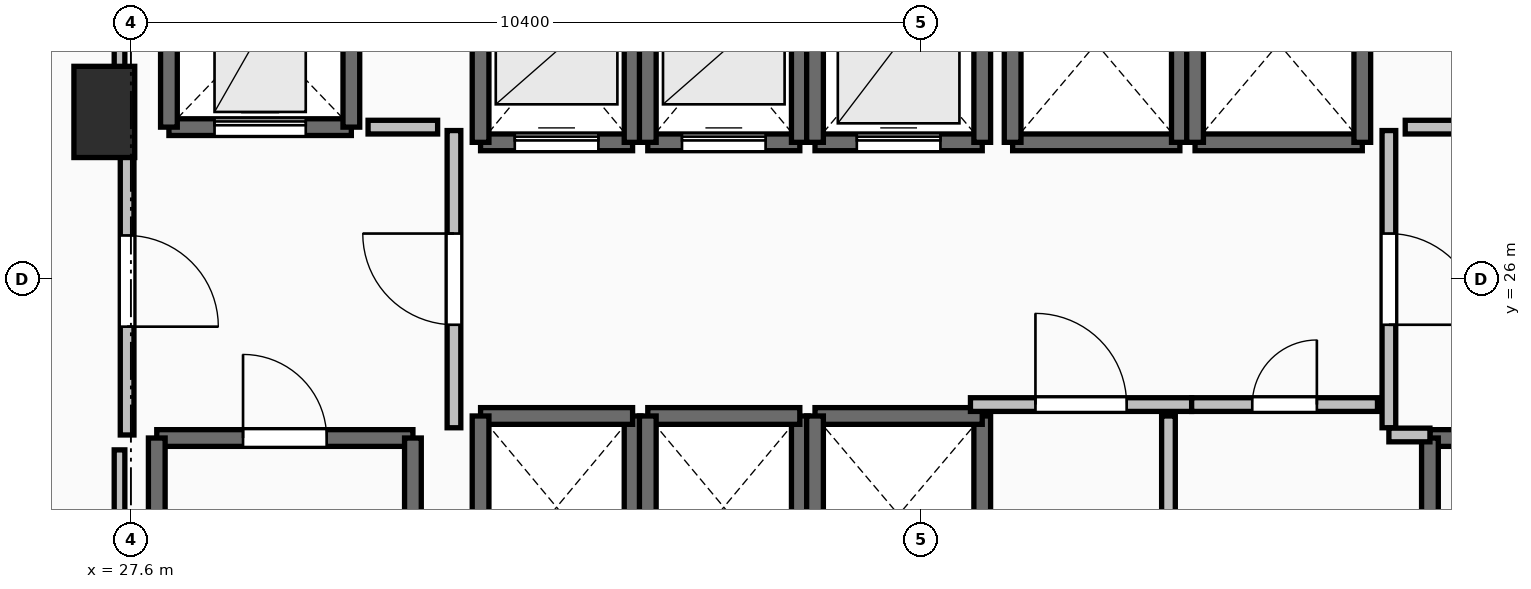
"""IFC4 building model, lengths in metres.
Left out: names, types, materials, properties, quantities, classifications, styles, units other than length and angle.
Written with IfcOpenShell. Run it as: python <this file> out.ifc"""

import sys

from ifc_helpers import new_model, si_unit, direction, frame, frame_2d, origin, origin_2d, place, context, subcontext, project, spatial, rectangle, extrude, element, fill, save


model = new_model("IFC4")
c1 = context("Model", 3, precision=1e-05, world=origin(), true_north=direction((0.0, 1.0)))
c2 = subcontext(c1, "Body", "Model", "MODEL_VIEW")
j1 = project(units=[si_unit("LENGTHUNIT", "METRE"), si_unit("PLANEANGLEUNIT", "RADIAN")], contexts=[c1])
p1 = place(None, origin())
s1 = spatial("IfcSite", under=j1, at=p1, CompositionType="ELEMENT")
p2 = place(p1, origin())
s2 = spatial("IfcBuilding", under=s1, at=p2, CompositionType="ELEMENT")
p3 = place(p2, frame((0.0, 0.0, 96.3)))
s3 = spatial("IfcBuildingStorey", under=s2, at=p3, CompositionType="ELEMENT", Elevation=96.3)
p4 = place(p3, frame((27.25, 28.2, 0.0), z_axis=(0.0, 0.0, 1.0), x_axis=(1.0, 0.0, 0.0)))
e1 = element("IfcColumn", 1, at=p4, inside=s3, PredefinedType="PILASTER", context=c2, shape_type="SweptSolid", body=[
    extrude(rectangle(XDim=0.8, YDim=1.2, at=origin_2d()), origin(), (0.0, 0.0, 1.0), 3.5),
])
p5 = place(p3, frame((27.94, 23.91, 0.0), z_axis=(0.0, 0.0, 1.0), x_axis=(1.0, 0.0, 0.0)))
e2 = element("IfcWall", 2, at=p5, inside=s3, PredefinedType="SOLIDWALL", context=c2, shape_type="SweptSolid", body=[
    extrude(rectangle(XDim=3.37, YDim=0.22, at=frame_2d((1.685, 0.0))), origin(), (0.0, 0.0, 1.0), 3.24),
])
p6 = place(p5, frame((1.135, 0.0, 0.0)))
e3 = element("IfcOpeningElement", 3, at=p6, cuts=e2, PredefinedType="OPENING", context=c2, shape_type="SweptSolid", body=[
    extrude(rectangle(XDim=1.1, YDim=2.15, at=frame_2d((0.55, 1.075))), frame((0.0, 0.125, 0.0), z_axis=(0.0, -1.0, 0.0), x_axis=(1.0, 0.0, 0.0)), (0.0, 0.0, 1.0), 0.25),
])
for number, where, z_axis, x_axis in (
    (4, (31.31, 23.91, 0.0), (0.0, 0.0, 1.0), (0.0, -1.0, 0.0)),
    (5, (27.94, 16.49, 0.0), (0.0, 0.0, 1.0), (0.0, 1.0, 0.0)),
):
    element("IfcWall", number, at=place(p3, frame(where, z_axis=z_axis, x_axis=x_axis)), inside=s3, PredefinedType="SOLIDWALL", context=c2, shape_type="SweptSolid", body=[
        extrude(rectangle(XDim=7.42, YDim=0.22, at=frame_2d((3.71, 0.0))), origin(), (0.0, 0.0, 1.0), 3.24),
    ])
p7 = place(p3, frame((44.69, 23.91, 0.0), z_axis=(0.0, 0.0, 1.0), x_axis=(1.0, 0.0, 0.0)))
e6 = element("IfcWall", 6, at=p7, inside=s3, PredefinedType="SOLIDWALL", context=c2, shape_type="SweptSolid", body=[
    extrude(rectangle(XDim=3.37, YDim=0.22, at=frame_2d((1.685, 0.0))), origin(), (0.0, 0.0, 1.0), 3.24),
])
p8 = place(p7, frame((1.135, 0.0, 0.0)))
e7 = element("IfcOpeningElement", 7, at=p8, cuts=e6, PredefinedType="OPENING", context=c2, shape_type="SweptSolid", body=[
    extrude(rectangle(XDim=1.1, YDim=2.15, at=frame_2d((0.55, 1.075))), frame((0.0, 0.125, 0.0), z_axis=(0.0, -1.0, 0.0), x_axis=(1.0, 0.0, 0.0)), (0.0, 0.0, 1.0), 0.25),
])
p9 = place(p3, frame((44.69, 16.49, 0.0), z_axis=(0.0, 0.0, 1.0), x_axis=(0.0, 1.0, 0.0)))
e8 = element("IfcWall", 8, at=p9, inside=s3, PredefinedType="SOLIDWALL", context=c2, shape_type="SweptSolid", body=[
    extrude(rectangle(XDim=7.42, YDim=0.22, at=frame_2d((3.71, 0.0))), origin(), (0.0, 0.0, 1.0), 3.24),
])
p10 = place(p3, frame((32.2, 27.8, 0.0), z_axis=(0.0, 0.0, 1.0), x_axis=(1.0, 0.0, 0.0)))
e9 = element("IfcWall", 9, at=p10, inside=s3, PredefinedType="SOLIDWALL", context=c2, shape_type="SweptSolid", body=[
    extrude(rectangle(XDim=2.0, YDim=0.22, at=frame_2d((1.0, 0.0))), origin(), (0.0, 0.0, 1.0), 3.24),
])
p11 = place(p10, frame((0.45, 0.0, 0.0)))
e10 = element("IfcOpeningElement", 10, at=p11, cuts=e9, PredefinedType="OPENING", context=c2, shape_type="SweptSolid", body=[
    extrude(rectangle(XDim=1.1, YDim=2.2, at=frame_2d((0.55, 1.1))), frame((0.0, 0.125, 0.0), z_axis=(0.0, -1.0, 0.0), x_axis=(1.0, 0.0, 0.0)), (0.0, 0.0, 1.0), 0.25),
])
for number, where, z_axis, x_axis in (
    (11, (34.2, 27.8, 0.0), (0.0, 0.0, 1.0), (0.0, 1.0, 0.0)),
    (12, (32.2, 30.2, 0.0), (0.0, 0.0, 1.0), (0.0, -1.0, 0.0)),
):
    element("IfcWall", number, at=place(p3, frame(where, z_axis=z_axis, x_axis=x_axis)), inside=s3, PredefinedType="SOLIDWALL", context=c2, shape_type="SweptSolid", body=[
        extrude(rectangle(XDim=2.4, YDim=0.22, at=frame_2d((1.2, 0.0))), origin(), (0.0, 0.0, 1.0), 3.24),
    ])
p12 = place(p3, frame((34.4, 27.8, 0.0), z_axis=(0.0, 0.0, 1.0), x_axis=(1.0, 0.0, 0.0)))
e13 = element("IfcWall", 13, at=p12, inside=s3, PredefinedType="SOLIDWALL", context=c2, shape_type="SweptSolid", body=[
    extrude(rectangle(XDim=2.0, YDim=0.22, at=frame_2d((1.0, 0.0))), origin(), (0.0, 0.0, 1.0), 3.24),
])
p13 = place(p12, frame((0.45, 0.0, 0.0)))
e14 = element("IfcOpeningElement", 14, at=p13, cuts=e13, PredefinedType="OPENING", context=c2, shape_type="SweptSolid", body=[
    extrude(rectangle(XDim=1.1, YDim=2.2, at=frame_2d((0.55, 1.1))), frame((0.0, 0.125, 0.0), z_axis=(0.0, -1.0, 0.0), x_axis=(1.0, 0.0, 0.0)), (0.0, 0.0, 1.0), 0.25),
])
for number, where, z_axis, x_axis in (
    (15, (36.4, 27.8, 0.0), (0.0, 0.0, 1.0), (0.0, 1.0, 0.0)),
    (16, (34.4, 30.2, 0.0), (0.0, 0.0, 1.0), (0.0, -1.0, 0.0)),
):
    element("IfcWall", number, at=place(p3, frame(where, z_axis=z_axis, x_axis=x_axis)), inside=s3, PredefinedType="SOLIDWALL", context=c2, shape_type="SweptSolid", body=[
        extrude(rectangle(XDim=2.4, YDim=0.22, at=frame_2d((1.2, 0.0))), origin(), (0.0, 0.0, 1.0), 3.24),
    ])
p14 = place(p3, frame((36.6, 27.8, 0.0), z_axis=(0.0, 0.0, 1.0), x_axis=(1.0, 0.0, 0.0)))
e17 = element("IfcWall", 17, at=p14, inside=s3, PredefinedType="SOLIDWALL", context=c2, shape_type="SweptSolid", body=[
    extrude(rectangle(XDim=2.2, YDim=0.22, at=frame_2d((1.1, 0.0))), origin(), (0.0, 0.0, 1.0), 3.24),
])
p15 = place(p14, frame((0.55, 0.0, 0.0)))
e18 = element("IfcOpeningElement", 18, at=p15, cuts=e17, PredefinedType="OPENING", context=c2, shape_type="SweptSolid", body=[
    extrude(rectangle(XDim=1.1, YDim=2.2, at=frame_2d((0.55, 1.1))), frame((0.0, 0.125, 0.0), z_axis=(0.0, -1.0, 0.0), x_axis=(1.0, 0.0, 0.0)), (0.0, 0.0, 1.0), 0.25),
])
for number, where, z_axis, x_axis in (
    (19, (38.8, 27.8, 0.0), (0.0, 0.0, 1.0), (0.0, 1.0, 0.0)),
    (20, (36.6, 30.4, 0.0), (0.0, 0.0, 1.0), (0.0, -1.0, 0.0)),
):
    element("IfcWall", number, at=place(p3, frame(where, z_axis=z_axis, x_axis=x_axis)), inside=s3, PredefinedType="SOLIDWALL", context=c2, shape_type="SweptSolid", body=[
        extrude(rectangle(XDim=2.6, YDim=0.22, at=frame_2d((1.3, 0.0))), origin(), (0.0, 0.0, 1.0), 3.24),
    ])
p16 = place(p3, frame((34.2, 21.8, 0.0), z_axis=(0.0, 0.0, 1.0), x_axis=(0.0, 1.0, 0.0)))
e21 = element("IfcWall", 21, at=p16, inside=s3, PredefinedType="SOLIDWALL", context=c2, shape_type="SweptSolid", body=[
    extrude(rectangle(XDim=2.4, YDim=0.22, at=frame_2d((1.2, 0.0))), origin(), (0.0, 0.0, 1.0), 3.24),
])
p17 = place(p3, frame((34.2, 24.2, 0.0), z_axis=(0.0, 0.0, 1.0), x_axis=(-1.0, 0.0, 0.0)))
e22 = element("IfcWall", 22, at=p17, inside=s3, PredefinedType="SOLIDWALL", context=c2, shape_type="SweptSolid", body=[
    extrude(rectangle(XDim=2.0, YDim=0.22, at=frame_2d((1.0, 0.0))), origin(), (0.0, 0.0, 1.0), 3.24),
])
for number, where, z_axis, x_axis in (
    (23, (32.2, 24.2, 0.0), (0.0, 0.0, 1.0), (0.0, -1.0, 0.0)),
    (24, (36.4, 21.8, 0.0), (0.0, 0.0, 1.0), (0.0, 1.0, 0.0)),
):
    element("IfcWall", number, at=place(p3, frame(where, z_axis=z_axis, x_axis=x_axis)), inside=s3, PredefinedType="SOLIDWALL", context=c2, shape_type="SweptSolid", body=[
        extrude(rectangle(XDim=2.4, YDim=0.22, at=frame_2d((1.2, 0.0))), origin(), (0.0, 0.0, 1.0), 3.24),
    ])
p18 = place(p3, frame((36.4, 24.2, 0.0), z_axis=(0.0, 0.0, 1.0), x_axis=(-1.0, 0.0, 0.0)))
e25 = element("IfcWall", 25, at=p18, inside=s3, PredefinedType="SOLIDWALL", context=c2, shape_type="SweptSolid", body=[
    extrude(rectangle(XDim=2.0, YDim=0.22, at=frame_2d((1.0, 0.0))), origin(), (0.0, 0.0, 1.0), 3.24),
])
p19 = place(p3, frame((34.4, 24.2, 0.0), z_axis=(0.0, 0.0, 1.0), x_axis=(0.0, -1.0, 0.0)))
e26 = element("IfcWall", 26, at=p19, inside=s3, PredefinedType="SOLIDWALL", context=c2, shape_type="SweptSolid", body=[
    extrude(rectangle(XDim=2.4, YDim=0.22, at=frame_2d((1.2, 0.0))), origin(), (0.0, 0.0, 1.0), 3.24),
])
p20 = place(p3, frame((38.8, 21.6, 0.0), z_axis=(0.0, 0.0, 1.0), x_axis=(0.0, 1.0, 0.0)))
e27 = element("IfcWall", 27, at=p20, inside=s3, PredefinedType="SOLIDWALL", context=c2, shape_type="SweptSolid", body=[
    extrude(rectangle(XDim=2.6, YDim=0.22, at=frame_2d((1.3, 0.0))), origin(), (0.0, 0.0, 1.0), 3.24),
])
p21 = place(p3, frame((38.8, 24.2, 0.0), z_axis=(0.0, 0.0, 1.0), x_axis=(-1.0, 0.0, 0.0)))
e28 = element("IfcWall", 28, at=p21, inside=s3, PredefinedType="SOLIDWALL", context=c2, shape_type="SweptSolid", body=[
    extrude(rectangle(XDim=2.2, YDim=0.22, at=frame_2d((1.1, 0.0))), origin(), (0.0, 0.0, 1.0), 3.24),
])
p22 = place(p3, frame((36.6, 24.2, 0.0), z_axis=(0.0, 0.0, 1.0), x_axis=(0.0, -1.0, 0.0)))
e29 = element("IfcWall", 29, at=p22, inside=s3, PredefinedType="SOLIDWALL", context=c2, shape_type="SweptSolid", body=[
    extrude(rectangle(XDim=2.6, YDim=0.22, at=frame_2d((1.3, 0.0))), origin(), (0.0, 0.0, 1.0), 3.24),
])
p23 = place(p3, frame((39.2, 27.8, 0.0), z_axis=(0.0, 0.0, 1.0), x_axis=(1.0, 0.0, 0.0)))
e30 = element("IfcWall", 30, at=p23, inside=s3, PredefinedType="SOLIDWALL", context=c2, shape_type="SweptSolid", body=[
    extrude(rectangle(XDim=2.2, YDim=0.22, at=frame_2d((1.1, 0.0))), origin(), (0.0, 0.0, 1.0), 3.24),
])
for number, where, z_axis, x_axis in (
    (31, (41.4, 27.8, 0.0), (0.0, 0.0, 1.0), (0.0, 1.0, 0.0)),
    (32, (39.2, 30.4, 0.0), (0.0, 0.0, 1.0), (0.0, -1.0, 0.0)),
):
    element("IfcWall", number, at=place(p3, frame(where, z_axis=z_axis, x_axis=x_axis)), inside=s3, PredefinedType="SOLIDWALL", context=c2, shape_type="SweptSolid", body=[
        extrude(rectangle(XDim=2.6, YDim=0.22, at=frame_2d((1.3, 0.0))), origin(), (0.0, 0.0, 1.0), 3.24),
    ])
p24 = place(p3, frame((41.6, 27.8, 0.0), z_axis=(0.0, 0.0, 1.0), x_axis=(1.0, 0.0, 0.0)))
e33 = element("IfcWall", 33, at=p24, inside=s3, PredefinedType="SOLIDWALL", context=c2, shape_type="SweptSolid", body=[
    extrude(rectangle(XDim=2.2, YDim=0.22, at=frame_2d((1.1, 0.0))), origin(), (0.0, 0.0, 1.0), 3.24),
])
for number, where, z_axis, x_axis in (
    (34, (43.8, 27.8, 0.0), (0.0, 0.0, 1.0), (0.0, 1.0, 0.0)),
    (35, (41.6, 30.4, 0.0), (0.0, 0.0, 1.0), (0.0, -1.0, 0.0)),
):
    element("IfcWall", number, at=place(p3, frame(where, z_axis=z_axis, x_axis=x_axis)), inside=s3, PredefinedType="SOLIDWALL", context=c2, shape_type="SweptSolid", body=[
        extrude(rectangle(XDim=2.6, YDim=0.22, at=frame_2d((1.3, 0.0))), origin(), (0.0, 0.0, 1.0), 3.24),
    ])
p25 = place(p3, frame((28.1, 28.0, 0.0), z_axis=(0.0, 0.0, 1.0), x_axis=(1.0, 0.0, 0.0)))
e36 = element("IfcWall", 36, at=p25, inside=s3, PredefinedType="SHEAR", context=c2, shape_type="SweptSolid", body=[
    extrude(rectangle(XDim=2.4, YDim=0.22, at=frame_2d((1.2, 0.0))), origin(), (0.0, 0.0, 1.0), 3.24),
])
p26 = place(p25, frame((0.6, 0.0, 0.0)))
e37 = element("IfcOpeningElement", 37, at=p26, cuts=e36, PredefinedType="OPENING", context=c2, shape_type="SweptSolid", body=[
    extrude(rectangle(XDim=1.2, YDim=2.2, at=frame_2d((0.6, 1.1))), frame((0.0, 0.125, 0.0), z_axis=(0.0, -1.0, 0.0), x_axis=(1.0, 0.0, 0.0)), (0.0, 0.0, 1.0), 0.25),
])
for number, where, z_axis, x_axis in (
    (38, (30.5, 28.0, 0.0), (0.0, 0.0, 1.0), (0.0, 1.0, 0.0)),
    (39, (28.1, 30.5, 0.0), (0.0, 0.0, 1.0), (0.0, -1.0, 0.0)),
):
    element("IfcWall", number, at=place(p3, frame(where, z_axis=z_axis, x_axis=x_axis)), inside=s3, PredefinedType="SHEAR", context=c2, shape_type="SweptSolid", body=[
        extrude(rectangle(XDim=2.5, YDim=0.22, at=frame_2d((1.25, 0.0))), origin(), (0.0, 0.0, 1.0), 3.24),
    ])
p27 = place(p3, frame((31.85, 24.045, 0.0), z_axis=(0.0, 0.0, 1.0), x_axis=(0.0, 1.0, 0.0)))
e40 = element("IfcWall", 40, at=p27, inside=s3, PredefinedType="PARTITIONING", context=c2, shape_type="SweptSolid", body=[
    extrude(rectangle(XDim=3.91, YDim=0.18, at=frame_2d((1.955, 0.0))), origin(), (0.0, 0.0, 1.0), 3.24),
])
p28 = place(p27, frame((1.355, 0.0, 0.0)))
e41 = element("IfcOpeningElement", 41, at=p28, cuts=e40, PredefinedType="OPENING", context=c2, shape_type="SweptSolid", body=[
    extrude(rectangle(XDim=1.2, YDim=2.15, at=frame_2d((0.6, 1.075))), frame((0.0, 0.105, 0.0), z_axis=(0.0, -1.0, 0.0), x_axis=(1.0, 0.0, 0.0)), (0.0, 0.0, 1.0), 0.21),
])
p29 = place(p3, frame((27.55, 28.0, 0.0), z_axis=(0.0, 0.0, 1.0), x_axis=(0.0, -1.0, 0.0)))
e42 = element("IfcWall", 42, at=p29, inside=s3, PredefinedType="PARTITIONING", context=c2, shape_type="SweptSolid", body=[
    extrude(rectangle(XDim=4.05, YDim=0.18, at=frame_2d((2.025, 0.0))), origin(), (0.0, 0.0, 1.0), 3.24),
])
p30 = place(p29, frame((1.425, 0.0, 0.0)))
e43 = element("IfcOpeningElement", 43, at=p30, cuts=e42, PredefinedType="OPENING", context=c2, shape_type="SweptSolid", body=[
    extrude(rectangle(XDim=1.2, YDim=2.15, at=frame_2d((0.6, 1.075))), frame((0.0, 0.105, 0.0), z_axis=(0.0, -1.0, 0.0), x_axis=(1.0, 0.0, 0.0)), (0.0, 0.0, 1.0), 0.21),
])
p31 = place(p3, frame((44.15, 27.955, 0.0), z_axis=(0.0, 0.0, 1.0), x_axis=(0.0, -1.0, 0.0)))
e44 = element("IfcWall", 44, at=p31, inside=s3, PredefinedType="PARTITIONING", context=c2, shape_type="SweptSolid", body=[
    extrude(rectangle(XDim=3.91, YDim=0.18, at=frame_2d((1.955, 0.0))), origin(), (0.0, 0.0, 1.0), 3.24),
])
p32 = place(p31, frame((1.355, 0.0, 0.0)))
e45 = element("IfcOpeningElement", 45, at=p32, cuts=e44, PredefinedType="OPENING", context=c2, shape_type="SweptSolid", body=[
    extrude(rectangle(XDim=1.2, YDim=2.15, at=frame_2d((0.6, 1.075))), frame((0.0, 0.105, 0.0), z_axis=(0.0, -1.0, 0.0), x_axis=(1.0, 0.0, 0.0)), (0.0, 0.0, 1.0), 0.21),
])
p33 = place(p3, frame((44.15, 23.95, 0.0), z_axis=(0.0, 0.0, 1.0), x_axis=(1.0, 0.0, 0.0)))
e46 = element("IfcWall", 46, at=p33, inside=s3, PredefinedType="PARTITIONING", context=c2, shape_type="SweptSolid", body=[
    extrude(rectangle(XDim=0.54, YDim=0.18, at=frame_2d((0.27, 0.0))), origin(), (0.0, 0.0, 1.0), 3.24),
])
p34 = place(p3, frame((38.645, 24.35, 0.0), z_axis=(0.0, 0.0, 1.0), x_axis=(1.0, 0.0, 0.0)))
e47 = element("IfcWall", 47, at=p34, inside=s3, PredefinedType="PARTITIONING", context=c2, shape_type="SweptSolid", body=[
    extrude(rectangle(XDim=2.91, YDim=0.18, at=frame_2d((1.455, 0.0))), origin(), (0.0, 0.0, 1.0), 3.24),
])
p35 = place(p34, frame((0.855, 0.0, 0.0)))
e48 = element("IfcOpeningElement", 48, at=p35, cuts=e47, PredefinedType="OPENING", context=c2, shape_type="SweptSolid", body=[
    extrude(rectangle(XDim=1.2, YDim=2.15, at=frame_2d((0.6, 1.075))), frame((0.0, 0.105, 0.0), z_axis=(0.0, -1.0, 0.0), x_axis=(1.0, 0.0, 0.0)), (0.0, 0.0, 1.0), 0.21),
])
p36 = place(p3, frame((41.555, 24.35, 0.0), z_axis=(0.0, 0.0, 1.0), x_axis=(1.0, 0.0, 0.0)))
e49 = element("IfcWall", 49, at=p36, inside=s3, PredefinedType="PARTITIONING", context=c2, shape_type="SweptSolid", body=[
    extrude(rectangle(XDim=2.445, YDim=0.18, at=frame_2d((1.223, 0.0))), origin(), (0.0, 0.0, 1.0), 3.24),
])
p37 = place(p36, frame((0.798, 0.0, 0.0)))
e50 = element("IfcOpeningElement", 50, at=p37, cuts=e49, PredefinedType="OPENING", context=c2, shape_type="SweptSolid", body=[
    extrude(rectangle(XDim=0.85, YDim=2.1, at=frame_2d((0.425, 1.05))), frame((0.0, 0.105, 0.0), z_axis=(0.0, -1.0, 0.0), x_axis=(1.0, 0.0, 0.0)), (0.0, 0.0, 1.0), 0.21),
])
p38 = place(p3, frame((41.25, 20.305, 0.0), z_axis=(0.0, 0.0, 1.0), x_axis=(0.0, 1.0, 0.0)))
e51 = element("IfcWall", 51, at=p38, inside=s3, PredefinedType="PARTITIONING", context=c2, shape_type="SweptSolid", body=[
    extrude(rectangle(XDim=3.895, YDim=0.18, at=frame_2d((1.948, 0.0))), origin(), (0.0, 0.0, 1.0), 3.24),
])
p39 = place(p38, frame((1.522, 0.0, 0.0)))
e52 = element("IfcOpeningElement", 52, at=p39, cuts=e51, PredefinedType="OPENING", context=c2, shape_type="SweptSolid", body=[
    extrude(rectangle(XDim=0.85, YDim=2.1, at=frame_2d((0.425, 1.05))), frame((0.0, 0.105, 0.0), z_axis=(0.0, -1.0, 0.0), x_axis=(1.0, 0.0, 0.0)), (0.0, 0.0, 1.0), 0.21),
])
for number, where, z_axis, x_axis in (
    (53, (31.635, 28.0, 0.0), (0.0, 0.0, 1.0), (-1.0, 0.0, 0.0)),
    (54, (45.28, 28.0, 0.0), (0.0, 0.0, 1.0), (-1.0, 0.0, 0.0)),
):
    element("IfcWall", number, at=place(p3, frame(where, z_axis=z_axis, x_axis=x_axis)), inside=s3, PredefinedType="PARTITIONING", context=c2, shape_type="SweptSolid", body=[
        extrude(rectangle(XDim=0.915, YDim=0.18, at=frame_2d((0.458, 0.0))), origin(), (0.0, 0.0, 1.0), 3.24),
    ])
p40 = place(p3, frame((27.45, 16.24, 0.0), z_axis=(0.0, 0.0, 1.0), x_axis=(0.0, 1.0, 0.0)))
e55 = element("IfcWall", 55, at=p40, inside=s3, PredefinedType="PARTITIONING", context=c2, shape_type="SweptSolid", body=[
    extrude(rectangle(XDim=7.514, YDim=0.14, at=frame_2d((3.757, 0.0))), origin(), (0.0, 0.0, 1.0), 2.432),
])
p41 = place(p3, frame((27.45, 28.196, 0.0), z_axis=(0.0, 0.0, 1.0), x_axis=(0.0, 1.0, 0.0)))
e56 = element("IfcWall", 56, at=p41, inside=s3, PredefinedType="PARTITIONING", context=c2, shape_type="SweptSolid", body=[
    extrude(rectangle(XDim=5.254, YDim=0.14, at=frame_2d((2.627, 0.0))), origin(), (0.0, 0.0, 1.0), 2.432),
])
p42 = place(p6, origin())
e57 = element("IfcDoor", 57, at=p42, inside=s3, OperationType="SINGLE_SWING_LEFT", PredefinedType="DOOR", context=c2, shape_type="SweptSolid", body=[
    extrude(rectangle(XDim=1.1, YDim=2.15, at=frame_2d((0.55, 1.075))), frame((0.0, 0.025, 0.0), z_axis=(0.0, -1.0, 0.0), x_axis=(1.0, 0.0, 0.0)), (0.0, 0.0, 1.0), 0.05),
])
fill(e3, e57)
p43 = place(p11, origin())
e58 = element("IfcDoor", 58, at=p43, inside=s3, OperationType="SLIDING_TO_LEFT", PredefinedType="DOOR", context=c2, shape_type="SweptSolid", body=[
    extrude(rectangle(XDim=1.1, YDim=2.2, at=frame_2d((0.55, 1.1))), frame((0.0, 0.025, 0.0), z_axis=(0.0, -1.0, 0.0), x_axis=(1.0, 0.0, 0.0)), (0.0, 0.0, 1.0), 0.05),
])
fill(e10, e58)
p44 = place(p13, origin())
e59 = element("IfcDoor", 59, at=p44, inside=s3, OperationType="SLIDING_TO_LEFT", PredefinedType="DOOR", context=c2, shape_type="SweptSolid", body=[
    extrude(rectangle(XDim=1.1, YDim=2.2, at=frame_2d((0.55, 1.1))), frame((0.0, 0.025, 0.0), z_axis=(0.0, -1.0, 0.0), x_axis=(1.0, 0.0, 0.0)), (0.0, 0.0, 1.0), 0.05),
])
fill(e14, e59)
p45 = place(p15, origin())
e60 = element("IfcDoor", 60, at=p45, inside=s3, OperationType="SLIDING_TO_LEFT", PredefinedType="DOOR", context=c2, shape_type="SweptSolid", body=[
    extrude(rectangle(XDim=1.1, YDim=2.2, at=frame_2d((0.55, 1.1))), frame((0.0, 0.025, 0.0), z_axis=(0.0, -1.0, 0.0), x_axis=(1.0, 0.0, 0.0)), (0.0, 0.0, 1.0), 0.05),
])
fill(e18, e60)
p46 = place(p26, origin())
e61 = element("IfcDoor", 61, at=p46, inside=s3, OperationType="SLIDING_TO_LEFT", PredefinedType="DOOR", context=c2, shape_type="SweptSolid", body=[
    extrude(rectangle(XDim=1.2, YDim=2.2, at=frame_2d((0.6, 1.1))), frame((0.0, 0.025, 0.0), z_axis=(0.0, -1.0, 0.0), x_axis=(1.0, 0.0, 0.0)), (0.0, 0.0, 1.0), 0.05),
])
fill(e37, e61)
p47 = place(p28, origin())
e62 = element("IfcDoor", 62, at=p47, inside=s3, OperationType="SINGLE_SWING_RIGHT", PredefinedType="DOOR", context=c2, shape_type="SweptSolid", body=[
    extrude(rectangle(XDim=1.2, YDim=2.15, at=frame_2d((0.6, 1.075))), frame((0.0, 0.025, 0.0), z_axis=(0.0, -1.0, 0.0), x_axis=(1.0, 0.0, 0.0)), (0.0, 0.0, 1.0), 0.05),
])
fill(e41, e62)
p48 = place(p30, origin())
e63 = element("IfcDoor", 63, at=p48, inside=s3, OperationType="SINGLE_SWING_RIGHT", PredefinedType="DOOR", context=c2, shape_type="SweptSolid", body=[
    extrude(rectangle(XDim=1.2, YDim=2.15, at=frame_2d((0.6, 1.075))), frame((0.0, 0.025, 0.0), z_axis=(0.0, -1.0, 0.0), x_axis=(1.0, 0.0, 0.0)), (0.0, 0.0, 1.0), 0.05),
])
fill(e43, e63)
p49 = place(p32, origin())
e64 = element("IfcDoor", 64, at=p49, inside=s3, OperationType="SINGLE_SWING_RIGHT", PredefinedType="DOOR", context=c2, shape_type="SweptSolid", body=[
    extrude(rectangle(XDim=1.2, YDim=2.15, at=frame_2d((0.6, 1.075))), frame((0.0, 0.025, 0.0), z_axis=(0.0, -1.0, 0.0), x_axis=(1.0, 0.0, 0.0)), (0.0, 0.0, 1.0), 0.05),
])
fill(e45, e64)
p50 = place(p35, origin())
e65 = element("IfcDoor", 65, at=p50, inside=s3, OperationType="SINGLE_SWING_LEFT", PredefinedType="DOOR", context=c2, shape_type="SweptSolid", body=[
    extrude(rectangle(XDim=1.2, YDim=2.15, at=frame_2d((0.6, 1.075))), frame((0.0, 0.025, 0.0), z_axis=(0.0, -1.0, 0.0), x_axis=(1.0, 0.0, 0.0)), (0.0, 0.0, 1.0), 0.05),
])
fill(e48, e65)
p51 = place(p37, origin())
e66 = element("IfcDoor", 66, at=p51, inside=s3, OperationType="SINGLE_SWING_RIGHT", PredefinedType="DOOR", context=c2, shape_type="SweptSolid", body=[
    extrude(rectangle(XDim=0.85, YDim=2.1, at=frame_2d((0.425, 1.05))), frame((0.0, 0.025, 0.0), z_axis=(0.0, -1.0, 0.0), x_axis=(1.0, 0.0, 0.0)), (0.0, 0.0, 1.0), 0.05),
])
fill(e50, e66)
save(model, sys.argv[1])
